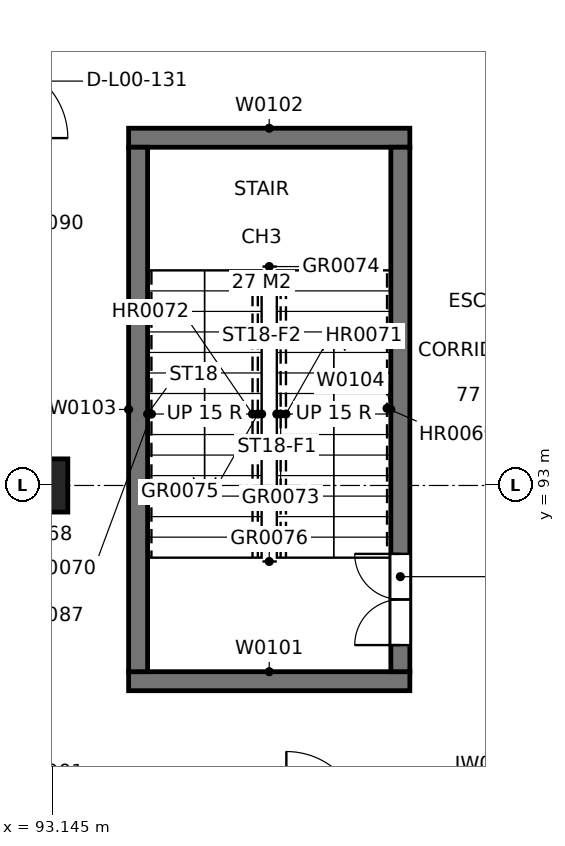
"""IFC4 building model, lengths in metres.
Left out: names, types, materials, properties, quantities, classifications, styles, units other than length and angle.
Written with IfcOpenShell. Run it as: python <this file> out.ifc"""

import sys

from ifc_helpers import new_model, si_unit, direction, frame, frame_2d, origin, origin_2d, place, context, subcontext, project, spatial, rectangle, extrude, element, fill, save


model = new_model("IFC4")
c1 = context("Model", 3, precision=1e-05, world=origin(), true_north=direction((0.0, 1.0)))
c2 = subcontext(c1, "Body", "Model", "MODEL_VIEW")
j1 = project(units=[si_unit("LENGTHUNIT", "METRE"), si_unit("PLANEANGLEUNIT", "RADIAN")], contexts=[c1])
p1 = place(None, origin())
s1 = spatial("IfcSite", under=j1, at=p1, CompositionType="ELEMENT")
p2 = place(p1, origin())
s2 = spatial("IfcBuilding", under=s1, at=p2, CompositionType="ELEMENT")
p3 = place(p2, origin())
s3 = spatial("IfcBuildingStorey", under=s2, at=p3, CompositionType="ELEMENT", Elevation=0.0)
p4 = place(p3, frame((93.0, 93.0, -0.4), z_axis=(0.0, 0.0, 1.0), x_axis=(1.0, 0.0, 0.0)))
e1 = element("IfcColumn", 1, at=p4, inside=s3, PredefinedType="COLUMN", context=c2, shape_type="SweptSolid", body=[
    extrude(rectangle(XDim=0.7, YDim=0.7, at=origin_2d()), origin(), (0.0, 0.0, 1.0), 5.2),
])
for number, where, z_axis, x_axis in (
    (2, (94.15, 90.425, 0.0), (0.0, 0.0, 1.0), (1.0, 0.0, 0.0)),
    (3, (94.15, 97.575, 0.0), (0.0, 0.0, 1.0), (1.0, 0.0, 0.0)),
):
    element("IfcWall", number, at=place(p3, frame(where, z_axis=z_axis, x_axis=x_axis)), inside=s3, PredefinedType="SOLIDWALL", context=c2, shape_type="SweptSolid", body=[
        extrude(rectangle(XDim=3.7, YDim=0.25, at=frame_2d((1.85, 0.0))), origin(), (0.0, 0.0, 1.0), 4.8),
    ])
p5 = place(p3, frame((94.275, 90.55, 0.0), z_axis=(0.0, 0.0, 1.0), x_axis=(0.0, 1.0, 0.0)))
e4 = element("IfcWall", 4, at=p5, inside=s3, PredefinedType="SOLIDWALL", context=c2, shape_type="SweptSolid", body=[
    extrude(rectangle(XDim=6.9, YDim=0.25, at=frame_2d((3.45, 0.0))), origin(), (0.0, 0.0, 1.0), 4.8),
])
p6 = place(p3, frame((97.725, 90.55, 0.0), z_axis=(0.0, 0.0, 1.0), x_axis=(0.0, 1.0, 0.0)))
e5 = element("IfcWall", 5, at=p6, inside=s3, PredefinedType="SOLIDWALL", context=c2, shape_type="SweptSolid", body=[
    extrude(rectangle(XDim=6.9, YDim=0.25, at=frame_2d((3.45, 0.0))), origin(), (0.0, 0.0, 1.0), 4.8),
])
p7 = place(p6, frame((0.35, 0.0, 0.0)))
e6 = element("IfcOpeningElement", 6, at=p7, cuts=e5, PredefinedType="OPENING", context=c2, shape_type="SweptSolid", body=[
    extrude(rectangle(XDim=1.2, YDim=2.1, at=frame_2d((0.6, 1.05))), frame((0.0, 0.135, 0.0), z_axis=(0.0, -1.0, 0.0), x_axis=(1.0, 0.0, 0.0)), (0.0, 0.0, 1.0), 0.27),
])
p8 = place(p7, origin())
e7 = element("IfcDoor", 7, at=p8, inside=s3, OperationType="DOUBLE_DOOR_SINGLE_SWING", PredefinedType="DOOR", context=c2, shape_type="SweptSolid", body=[
    extrude(rectangle(XDim=1.2, YDim=2.1, at=frame_2d((0.6, 1.05))), frame((0.0, 0.025, 0.0), z_axis=(0.0, -1.0, 0.0), x_axis=(1.0, 0.0, 0.0)), (0.0, 0.0, 1.0), 0.05),
])
fill(e6, e7)
save(model, sys.argv[1])
